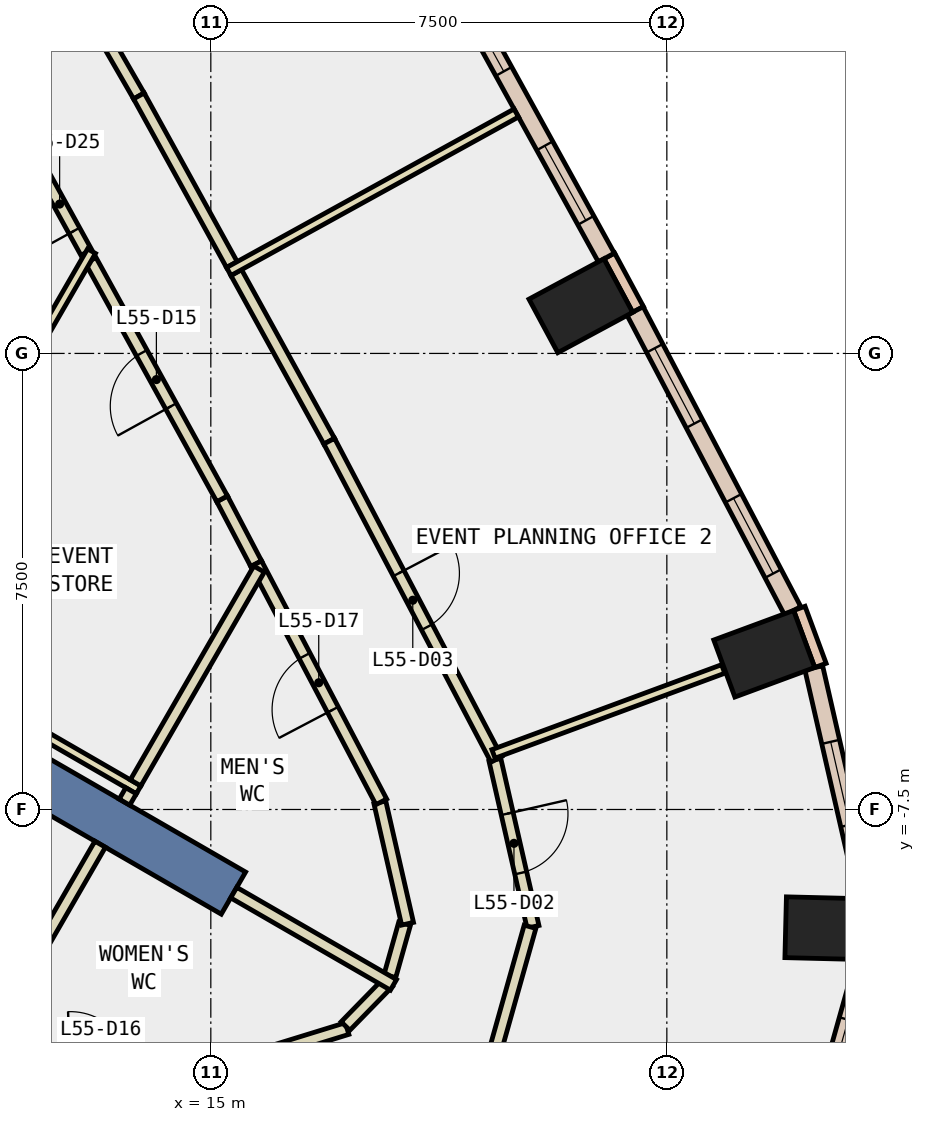
"""IFC4 building model, lengths in metres.
Left out: names, types, materials, properties, quantities, classifications, styles, units other than length and angle.
Written with IfcOpenShell. Run it as: python <this file> out.ifc"""

import sys

from ifc_helpers import new_model, si_unit, direction, frame, frame_2d, origin, origin_2d, place, context, subcontext, project, spatial, rectangle, extrude, element, fill, save


model = new_model("IFC4")
c1 = context("Model", 3, precision=1e-05, world=origin(), true_north=direction((0.0, 1.0)))
c2 = subcontext(c1, "Body", "Model", "MODEL_VIEW")
j1 = project(units=[si_unit("LENGTHUNIT", "METRE"), si_unit("PLANEANGLEUNIT", "RADIAN")], contexts=[c1])
p1 = place(None, origin())
s1 = spatial("IfcSite", under=j1, at=p1, CompositionType="ELEMENT")
p2 = place(p1, origin())
s2 = spatial("IfcBuilding", under=s1, at=p2, CompositionType="ELEMENT")
p3 = place(p2, frame((0.0, 0.0, 245.0)))
s3 = spatial("IfcBuildingStorey", under=s2, at=p3, CompositionType="ELEMENT", Elevation=245.0)
for number, where, z_axis, x_axis in (
    (1, (25.154, -9.454, -0.34), (0.0, 0.0, 1.0), (0.025, 1.0, 0.0)),
    (2, (24.102, -4.939, -0.34), (0.0, 0.0, 1.0), (-0.347, 0.938, 0.0)),
    (3, (21.086, 0.784, -0.34), (0.0, 0.0, 1.0), (-0.474, 0.881, 0.0)),
):
    element("IfcColumn", number, at=place(p3, frame(where, z_axis=z_axis, x_axis=x_axis)), inside=s3, PredefinedType="COLUMN", context=c2, shape_type="SweptSolid", body=[
        extrude(rectangle(XDim=1.0, YDim=1.4, at=origin_2d()), origin(), (0.0, 0.0, 1.0), 3.6),
    ])
p4 = place(p3, frame((7.578, -4.375, -0.34), z_axis=(0.0, 0.0, 1.0), x_axis=(0.866024315419, -0.5000018851, 0.0)))
e4 = element("IfcWall", 4, at=p4, inside=s3, PredefinedType="SHEAR", context=c2, shape_type="SweptSolid", body=[
    extrude(rectangle(XDim=9.0, YDim=0.8, at=frame_2d((4.5, 0.0))), origin(), (0.0, 0.0, 1.0), 3.6),
])
p5 = place(p3, frame((25.026, -5.131, 0.0), z_axis=(0.0, 0.0, 1.0), x_axis=(-0.346892928577, 0.937904737222, 0.0)))
e5 = element("IfcWall", 5, at=p5, inside=s3, PredefinedType="STANDARD", context=c2, shape_type="SweptSolid", body=[
    extrude(rectangle(XDim=1.0, YDim=0.2, at=frame_2d((0.5, 0.0))), origin(), (0.0, 0.0, 1.0), 3.26),
])
p6 = place(p3, frame((22.027, 0.723, 0.0), z_axis=(0.0, 0.0, 1.0), x_axis=(-0.473852444207, 0.880604259085, 0.0)))
e6 = element("IfcWall", 6, at=p6, inside=s3, PredefinedType="STANDARD", context=c2, shape_type="SweptSolid", body=[
    extrude(rectangle(XDim=1.0, YDim=0.2, at=frame_2d((0.5, 0.0))), origin(), (0.0, 0.0, 1.0), 3.26),
])
p7 = place(p3, frame((24.824, -13.295, 0.0), z_axis=(0.0, 0.0, 1.0), x_axis=(0.270837632743, 0.962625044703, 0.0)))
e7 = element("IfcWall", 7, at=p7, inside=s3, PredefinedType="STANDARD", context=c2, shape_type="SweptSolid", body=[
    extrude(rectangle(XDim=3.456, YDim=0.3, at=frame_2d((1.728, 0.0))), origin(), (0.0, 0.0, 1.0), 3.26),
])
p8 = place(p7, frame((1.028, 0.0, 0.9)))
e8 = element("IfcOpeningElement", 8, at=p8, cuts=e7, PredefinedType="OPENING", context=c2, shape_type="SweptSolid", body=[
    extrude(rectangle(XDim=1.4, YDim=2.0, at=frame_2d((0.7, 1.0))), frame((0.0, 0.16, 0.0), z_axis=(0.0, -1.0, 0.0), x_axis=(1.0, 0.0, 0.0)), (0.0, 0.0, 1.0), 0.32),
])
p9 = place(p3, frame((25.785, -8.97, 0.0), z_axis=(0.0, 0.0, 1.0), x_axis=(-0.222901327396, 0.974841011778, 0.0)))
e9 = element("IfcWall", 9, at=p9, inside=s3, PredefinedType="STANDARD", context=c2, shape_type="SweptSolid", body=[
    extrude(rectangle(XDim=3.898, YDim=0.3, at=frame_2d((1.949, 0.0))), origin(), (0.0, 0.0, 1.0), 3.26),
])
p10 = place(p9, frame((1.249, 0.0, 0.9)))
e10 = element("IfcOpeningElement", 10, at=p10, cuts=e9, PredefinedType="OPENING", context=c2, shape_type="SweptSolid", body=[
    extrude(rectangle(XDim=1.4, YDim=2.0, at=frame_2d((0.7, 1.0))), frame((0.0, 0.16, 0.0), z_axis=(0.0, -1.0, 0.0), x_axis=(1.0, 0.0, 0.0)), (0.0, 0.0, 1.0), 0.32),
])
p11 = place(p3, frame((24.57, -4.234, 0.0), z_axis=(0.0, 0.0, 1.0), x_axis=(-0.465228032148, 0.885190871001, 0.0)))
e11 = element("IfcWall", 11, at=p11, inside=s3, PredefinedType="STANDARD", context=c2, shape_type="SweptSolid", body=[
    extrude(rectangle(XDim=5.572, YDim=0.3, at=frame_2d((2.786, 0.0))), origin(), (0.0, 0.0, 1.0), 3.26),
])
p12 = place(p11, frame((0.693, 0.0, 0.9)))
e12 = element("IfcOpeningElement", 12, at=p12, cuts=e11, PredefinedType="OPENING", context=c2, shape_type="SweptSolid", body=[
    extrude(rectangle(XDim=1.4, YDim=2.0, at=frame_2d((0.7, 1.0))), frame((0.0, 0.16, 0.0), z_axis=(0.0, -1.0, 0.0), x_axis=(1.0, 0.0, 0.0)), (0.0, 0.0, 1.0), 0.32),
])
p13 = place(p11, frame((3.479, 0.0, 0.9)))
e13 = element("IfcOpeningElement", 13, at=p13, cuts=e11, PredefinedType="OPENING", context=c2, shape_type="SweptSolid", body=[
    extrude(rectangle(XDim=1.4, YDim=2.0, at=frame_2d((0.7, 1.0))), frame((0.0, 0.16, 0.0), z_axis=(0.0, -1.0, 0.0), x_axis=(1.0, 0.0, 0.0)), (0.0, 0.0, 1.0), 0.32),
])
p14 = place(p3, frame((21.505, 1.577, 0.0), z_axis=(0.0, 0.0, 1.0), x_axis=(-0.482734585173, 0.875766704253, 0.0)))
e14 = element("IfcWall", 14, at=p14, inside=s3, PredefinedType="STANDARD", context=c2, shape_type="SweptSolid", body=[
    extrude(rectangle(XDim=5.593, YDim=0.3, at=frame_2d((2.796, 0.0))), origin(), (0.0, 0.0, 1.0), 3.26),
])
p15 = place(p14, frame((0.698, 0.0, 0.9)))
e15 = element("IfcOpeningElement", 15, at=p15, cuts=e14, PredefinedType="OPENING", context=c2, shape_type="SweptSolid", body=[
    extrude(rectangle(XDim=1.4, YDim=2.0, at=frame_2d((0.7, 1.0))), frame((0.0, 0.16, 0.0), z_axis=(0.0, -1.0, 0.0), x_axis=(1.0, 0.0, 0.0)), (0.0, 0.0, 1.0), 0.32),
])
p16 = place(p14, frame((3.495, 0.0, 0.9)))
e16 = element("IfcOpeningElement", 16, at=p16, cuts=e14, PredefinedType="OPENING", context=c2, shape_type="SweptSolid", body=[
    extrude(rectangle(XDim=1.4, YDim=2.0, at=frame_2d((0.7, 1.0))), frame((0.0, 0.16, 0.0), z_axis=(0.0, -1.0, 0.0), x_axis=(1.0, 0.0, 0.0)), (0.0, 0.0, 1.0), 0.32),
])
p17 = place(p3, frame((12.952, 1.661, 0.0), z_axis=(0.0, 0.0, 1.0), x_axis=(-0.482707835392, 0.875781448566, 0.0)))
e17 = element("IfcWall", 17, at=p17, inside=s3, PredefinedType="PARTITIONING", context=c2, shape_type="SweptSolid", body=[
    extrude(rectangle(XDim=1.817, YDim=0.2, at=frame_2d((0.908, 0.0))), origin(), (0.0, 0.0, 1.0), 3.26),
])
p18 = place(p17, frame((0.408, 0.0, 0.0)))
e18 = element("IfcOpeningElement", 18, at=p18, cuts=e17, PredefinedType="OPENING", context=c2, shape_type="SweptSolid", body=[
    extrude(rectangle(XDim=1.0, YDim=2.1, at=frame_2d((0.5, 1.05))), frame((0.0, 0.11, 0.0), z_axis=(0.0, -1.0, 0.0), x_axis=(1.0, 0.0, 0.0)), (0.0, 0.0, 1.0), 0.22),
])
p19 = place(p3, frame((15.746, -3.458, 0.0), z_axis=(0.0, 0.0, 1.0), x_axis=(-0.464794189951, 0.885418748948, 0.0)))
e19 = element("IfcWall", 19, at=p19, inside=s3, PredefinedType="PARTITIONING", context=c2, shape_type="SweptSolid", body=[
    extrude(rectangle(XDim=1.205, YDim=0.2, at=frame_2d((0.603, 0.0))), origin(), (0.0, 0.0, 1.0), 3.26),
])
p20 = place(p3, frame((15.186, -2.391, 0.0), z_axis=(0.0, 0.0, 1.0), x_axis=(-0.482858240592, 0.875698532311, 0.0)))
e20 = element("IfcWall", 20, at=p20, inside=s3, PredefinedType="PARTITIONING", context=c2, shape_type="SweptSolid", body=[
    extrude(rectangle(XDim=4.478, YDim=0.2, at=frame_2d((2.239, 0.0))), origin(), (0.0, 0.0, 1.0), 3.26),
])
p21 = place(p20, frame((1.739, 0.0, 0.0)))
e21 = element("IfcOpeningElement", 21, at=p21, cuts=e20, PredefinedType="OPENING", context=c2, shape_type="SweptSolid", body=[
    extrude(rectangle(XDim=1.0, YDim=2.1, at=frame_2d((0.5, 1.05))), frame((0.0, 0.11, 0.0), z_axis=(0.0, -1.0, 0.0), x_axis=(1.0, 0.0, 0.0)), (0.0, 0.0, 1.0), 0.22),
])
p22 = place(p3, frame((15.295, -11.703, 0.0), z_axis=(0.0, 0.0, 1.0), x_axis=(0.95563113363, 0.294566013716, 0.0)))
e22 = element("IfcWall", 22, at=p22, inside=s3, PredefinedType="PARTITIONING", context=c2, shape_type="SweptSolid", body=[
    extrude(rectangle(XDim=2.036, YDim=0.2, at=frame_2d((1.018, 0.0))), origin(), (0.0, 0.0, 1.0), 3.26),
])
p23 = place(p3, frame((17.215, -11.061, 0.0), z_axis=(0.0, 0.0, 1.0), x_axis=(0.698527813511, 0.715582904877, 0.0)))
e23 = element("IfcWall", 23, at=p23, inside=s3, PredefinedType="PARTITIONING", context=c2, shape_type="SweptSolid", body=[
    extrude(rectangle(XDim=1.002, YDim=0.2, at=frame_2d((0.501, 0.0))), origin(), (0.0, 0.0, 1.0), 3.26),
])
p24 = place(p3, frame((17.945, -10.238, 0.0), z_axis=(0.0, 0.0, 1.0), x_axis=(0.270785141481, 0.962639811743, 0.0)))
e24 = element("IfcWall", 24, at=p24, inside=s3, PredefinedType="PARTITIONING", context=c2, shape_type="SweptSolid", body=[
    extrude(rectangle(XDim=0.894, YDim=0.2, at=frame_2d((0.447, 0.0))), origin(), (0.0, 0.0, 1.0), 3.26),
])
p25 = place(p3, frame((18.236, -9.379, 0.0), z_axis=(0.0, 0.0, 1.0), x_axis=(-0.222760041204, 0.974873306662, 0.0)))
e25 = element("IfcWall", 25, at=p25, inside=s3, PredefinedType="PARTITIONING", context=c2, shape_type="SweptSolid", body=[
    extrude(rectangle(XDim=2.047, YDim=0.2, at=frame_2d((1.024, 0.0))), origin(), (0.0, 0.0, 1.0), 3.26),
])
p26 = place(p3, frame((17.804, -7.374, 0.0), z_axis=(0.0, 0.0, 1.0), x_axis=(-0.465179971699, 0.885216128372, 0.0)))
e26 = element("IfcWall", 26, at=p26, inside=s3, PredefinedType="PARTITIONING", context=c2, shape_type="SweptSolid", body=[
    extrude(rectangle(XDim=4.424, YDim=0.2, at=frame_2d((2.212, 0.0))), origin(), (0.0, 0.0, 1.0), 3.26),
])
p27 = place(p26, frame((1.712, 0.0, 0.0)))
e27 = element("IfcOpeningElement", 27, at=p27, cuts=e26, PredefinedType="OPENING", context=c2, shape_type="SweptSolid", body=[
    extrude(rectangle(XDim=1.0, YDim=2.1, at=frame_2d((0.5, 1.05))), frame((0.0, 0.11, 0.0), z_axis=(0.0, -1.0, 0.0), x_axis=(1.0, 0.0, 0.0)), (0.0, 0.0, 1.0), 0.22),
])
p28 = place(p3, frame((19.672, -6.683, 0.0), z_axis=(0.0, 0.0, 1.0), x_axis=(0.222523624687, -0.974927298036, 0.0)))
e28 = element("IfcWall", 28, at=p28, inside=s3, PredefinedType="PARTITIONING", context=c2, shape_type="SweptSolid", body=[
    extrude(rectangle(XDim=2.817, YDim=0.2, at=frame_2d((1.409, 0.0))), origin(), (0.0, 0.0, 1.0), 3.26),
])
p29 = place(p28, frame((0.909, 0.0, 0.0)))
e29 = element("IfcOpeningElement", 29, at=p29, cuts=e28, PredefinedType="OPENING", context=c2, shape_type="SweptSolid", body=[
    extrude(rectangle(XDim=1.0, YDim=2.1, at=frame_2d((0.5, 1.05))), frame((0.0, 0.11, 0.0), z_axis=(0.0, -1.0, 0.0), x_axis=(1.0, 0.0, 0.0)), (0.0, 0.0, 1.0), 0.22),
])
p30 = place(p3, frame((20.25, -9.429, 0.0), z_axis=(0.0, 0.0, 1.0), x_axis=(-0.270905475888, -0.962605954238, 0.0)))
e30 = element("IfcWall", 30, at=p30, inside=s3, PredefinedType="PARTITIONING", context=c2, shape_type="SweptSolid", body=[
    extrude(rectangle(XDim=2.122, YDim=0.2, at=frame_2d((1.061, 0.0))), origin(), (0.0, 0.0, 1.0), 3.26),
])
p31 = place(p3, frame((15.418, 1.33, 0.0), z_axis=(0.0, 0.0, 1.0), x_axis=(0.482838875149, -0.875709210095, 0.0)))
e31 = element("IfcWall", 31, at=p31, inside=s3, PredefinedType="PARTITIONING", context=c2, shape_type="SweptSolid", body=[
    extrude(rectangle(XDim=3.167, YDim=0.2, at=frame_2d((1.583, 0.0))), origin(), (0.0, 0.0, 1.0), 3.26),
])
p32 = place(p3, frame((16.947, -1.443, 0.0), z_axis=(0.0, 0.0, 1.0), x_axis=(0.465133414481, -0.88524059257, 0.0)))
e32 = element("IfcWall", 32, at=p32, inside=s3, PredefinedType="PARTITIONING", context=c2, shape_type="SweptSolid", body=[
    extrude(rectangle(XDim=5.91, YDim=0.2, at=frame_2d((2.955, 0.0))), origin(), (0.0, 0.0, 1.0), 3.26),
])
p33 = place(p32, frame((2.455, 0.0, 0.0)))
e33 = element("IfcOpeningElement", 33, at=p33, cuts=e32, PredefinedType="OPENING", context=c2, shape_type="SweptSolid", body=[
    extrude(rectangle(XDim=1.0, YDim=2.1, at=frame_2d((0.5, 1.05))), frame((0.0, 0.11, 0.0), z_axis=(0.0, -1.0, 0.0), x_axis=(1.0, 0.0, 0.0)), (0.0, 0.0, 1.0), 0.22),
])
p34 = place(p3, frame((12.234, 6.977, 0.0), z_axis=(0.0, 0.0, 1.0), x_axis=(0.499820325382, -0.866129114125, 0.0)))
e34 = element("IfcWall", 34, at=p34, inside=s3, PredefinedType="PARTITIONING", context=c2, shape_type="SweptSolid", body=[
    extrude(rectangle(XDim=3.167, YDim=0.2, at=frame_2d((1.583, 0.0))), origin(), (0.0, 0.0, 1.0), 3.26),
])
p35 = place(p34, frame((1.084, 0.0, 0.0)))
e35 = element("IfcOpeningElement", 35, at=p35, cuts=e34, PredefinedType="OPENING", context=c2, shape_type="SweptSolid", body=[
    extrude(rectangle(XDim=1.0, YDim=2.1, at=frame_2d((0.5, 1.05))), frame((0.0, 0.11, 0.0), z_axis=(0.0, -1.0, 0.0), x_axis=(1.0, 0.0, 0.0)), (0.0, 0.0, 1.0), 0.22),
])
p36 = place(p3, frame((13.817, 4.234, 0.0), z_axis=(0.0, 0.0, 1.0), x_axis=(0.482871474341, -0.875691235121, 0.0)))
e36 = element("IfcWall", 36, at=p36, inside=s3, PredefinedType="PARTITIONING", context=c2, shape_type="SweptSolid", body=[
    extrude(rectangle(XDim=3.167, YDim=0.2, at=frame_2d((1.583, 0.0))), origin(), (0.0, 0.0, 1.0), 3.26),
])
p37 = place(p3, frame((9.358, -4.692, 0.0), z_axis=(0.0, 0.0, 1.0), x_axis=(0.500027777314, 0.866009365951, 0.0)))
e37 = element("IfcWall", 37, at=p37, inside=s3, PredefinedType="PARTITIONING", context=c2, shape_type="SweptSolid", body=[
    extrude(rectangle(XDim=7.36, YDim=0.15, at=frame_2d((3.68, 0.0))), origin(), (0.0, 0.0, 1.0), 3.26),
])
p38 = place(p3, frame((9.395, -4.627, 0.0), z_axis=(0.0, 0.0, 1.0), x_axis=(0.866034131428, -0.499984882974, 0.0)))
e38 = element("IfcWall", 38, at=p38, inside=s3, PredefinedType="PARTITIONING", context=c2, shape_type="SweptSolid", body=[
    extrude(rectangle(XDim=5.1, YDim=0.15, at=frame_2d((2.55, 0.0))), origin(), (0.0, 0.0, 1.0), 3.26),
])
p39 = place(p3, frame((13.18, -8.071, 0.0), z_axis=(0.0, 0.0, 1.0), x_axis=(-0.499914724673, -0.86607463192, 0.0)))
e39 = element("IfcWall", 39, at=p39, inside=s3, PredefinedType="PARTITIONING", context=c2, shape_type="SweptSolid", body=[
    extrude(rectangle(XDim=4.507, YDim=0.2, at=frame_2d((2.253, 0.0))), origin(), (0.0, 0.0, 1.0), 3.26),
])
p40 = place(p3, frame((13.688, -7.192, 0.0), z_axis=(0.0, 0.0, 1.0), x_axis=(-0.499787711288, -0.866147934042, 0.0)))
e40 = element("IfcWall", 40, at=p40, inside=s3, PredefinedType="PARTITIONING", context=c2, shape_type="SweptSolid", body=[
    extrude(rectangle(XDim=0.216, YDim=0.2, at=frame_2d((0.108, 0.0))), origin(), (0.0, 0.0, 1.0), 3.26),
])
p41 = place(p3, frame((15.793, -3.546, 0.0), z_axis=(0.0, 0.0, 1.0), x_axis=(-0.500000064182, -0.866025366729, 0.0)))
e41 = element("IfcWall", 41, at=p41, inside=s3, PredefinedType="PARTITIONING", context=c2, shape_type="SweptSolid", body=[
    extrude(rectangle(XDim=4.06, YDim=0.2, at=frame_2d((2.03, 0.0))), origin(), (0.0, 0.0, 1.0), 3.26),
])
p42 = place(p3, frame((15.377, -8.867, 0.0), z_axis=(0.0, 0.0, 1.0), x_axis=(0.865965767548, -0.500103278768, 0.0)))
e42 = element("IfcWall", 42, at=p42, inside=s3, PredefinedType="PARTITIONING", context=c2, shape_type="SweptSolid", body=[
    extrude(rectangle(XDim=3.033, YDim=0.2, at=frame_2d((1.517, 0.0))), origin(), (0.0, 0.0, 1.0), 3.26),
])
p43 = place(p3, frame((19.649, -6.586, 0.0), z_axis=(0.0, 0.0, 1.0), x_axis=(0.937935790958, 0.346808956114, 0.0)))
e43 = element("IfcWall", 43, at=p43, inside=s3, PredefinedType="PARTITIONING", context=c2, shape_type="SweptSolid", body=[
    extrude(rectangle(XDim=4.028, YDim=0.15, at=frame_2d((2.014, 0.0))), origin(), (0.0, 0.0, 1.0), 3.26),
])
p44 = place(p3, frame((15.295, 1.347, 0.0), z_axis=(0.0, 0.0, 1.0), x_axis=(0.875728645362, 0.482803624358, 0.0)))
e44 = element("IfcWall", 44, at=p44, inside=s3, PredefinedType="PARTITIONING", context=c2, shape_type="SweptSolid", body=[
    extrude(rectangle(XDim=5.4, YDim=0.15, at=frame_2d((2.7, 0.0))), origin(), (0.0, 0.0, 1.0), 3.26),
])
p45 = place(p8, origin())
e45 = element("IfcWindow", 45, at=p45, inside=s3, PartitioningType="SINGLE_PANEL", PredefinedType="WINDOW", context=c2, shape_type="SweptSolid", body=[
    extrude(rectangle(XDim=1.4, YDim=2.0, at=frame_2d((0.7, 1.0))), frame((0.0, 0.03, 0.0), z_axis=(0.0, -1.0, 0.0), x_axis=(1.0, 0.0, 0.0)), (0.0, 0.0, 1.0), 0.06),
])
fill(e8, e45)
p46 = place(p10, origin())
e46 = element("IfcWindow", 46, at=p46, inside=s3, PartitioningType="SINGLE_PANEL", PredefinedType="WINDOW", context=c2, shape_type="SweptSolid", body=[
    extrude(rectangle(XDim=1.4, YDim=2.0, at=frame_2d((0.7, 1.0))), frame((0.0, 0.03, 0.0), z_axis=(0.0, -1.0, 0.0), x_axis=(1.0, 0.0, 0.0)), (0.0, 0.0, 1.0), 0.06),
])
fill(e10, e46)
p47 = place(p12, origin())
e47 = element("IfcWindow", 47, at=p47, inside=s3, PartitioningType="SINGLE_PANEL", PredefinedType="WINDOW", context=c2, shape_type="SweptSolid", body=[
    extrude(rectangle(XDim=1.4, YDim=2.0, at=frame_2d((0.7, 1.0))), frame((0.0, 0.03, 0.0), z_axis=(0.0, -1.0, 0.0), x_axis=(1.0, 0.0, 0.0)), (0.0, 0.0, 1.0), 0.06),
])
fill(e12, e47)
p48 = place(p13, origin())
e48 = element("IfcWindow", 48, at=p48, inside=s3, PartitioningType="SINGLE_PANEL", PredefinedType="WINDOW", context=c2, shape_type="SweptSolid", body=[
    extrude(rectangle(XDim=1.4, YDim=2.0, at=frame_2d((0.7, 1.0))), frame((0.0, 0.03, 0.0), z_axis=(0.0, -1.0, 0.0), x_axis=(1.0, 0.0, 0.0)), (0.0, 0.0, 1.0), 0.06),
])
fill(e13, e48)
p49 = place(p15, origin())
e49 = element("IfcWindow", 49, at=p49, inside=s3, PartitioningType="SINGLE_PANEL", PredefinedType="WINDOW", context=c2, shape_type="SweptSolid", body=[
    extrude(rectangle(XDim=1.4, YDim=2.0, at=frame_2d((0.7, 1.0))), frame((0.0, 0.03, 0.0), z_axis=(0.0, -1.0, 0.0), x_axis=(1.0, 0.0, 0.0)), (0.0, 0.0, 1.0), 0.06),
])
fill(e15, e49)
p50 = place(p16, origin())
e50 = element("IfcWindow", 50, at=p50, inside=s3, PartitioningType="SINGLE_PANEL", PredefinedType="WINDOW", context=c2, shape_type="SweptSolid", body=[
    extrude(rectangle(XDim=1.4, YDim=2.0, at=frame_2d((0.7, 1.0))), frame((0.0, 0.03, 0.0), z_axis=(0.0, -1.0, 0.0), x_axis=(1.0, 0.0, 0.0)), (0.0, 0.0, 1.0), 0.06),
])
fill(e16, e50)
p51 = place(p29, origin())
e51 = element("IfcDoor", 51, at=p51, inside=s3, OperationType="SINGLE_SWING_LEFT", PredefinedType="DOOR", context=c2, shape_type="SweptSolid", body=[
    extrude(rectangle(XDim=1.0, YDim=2.1, at=frame_2d((0.5, 1.05))), frame((0.0, 0.025, 0.0), z_axis=(0.0, -1.0, 0.0), x_axis=(1.0, 0.0, 0.0)), (0.0, 0.0, 1.0), 0.05),
])
fill(e29, e51)
p52 = place(p33, origin())
e52 = element("IfcDoor", 52, at=p52, inside=s3, OperationType="SINGLE_SWING_LEFT", PredefinedType="DOOR", context=c2, shape_type="SweptSolid", body=[
    extrude(rectangle(XDim=1.0, YDim=2.1, at=frame_2d((0.5, 1.05))), frame((0.0, 0.025, 0.0), z_axis=(0.0, -1.0, 0.0), x_axis=(1.0, 0.0, 0.0)), (0.0, 0.0, 1.0), 0.05),
])
fill(e33, e52)
p53 = place(p21, origin())
e53 = element("IfcDoor", 53, at=p53, inside=s3, OperationType="SINGLE_SWING_LEFT", PredefinedType="DOOR", context=c2, shape_type="SweptSolid", body=[
    extrude(rectangle(XDim=1.0, YDim=2.1, at=frame_2d((0.5, 1.05))), frame((0.0, 0.025, 0.0), z_axis=(0.0, -1.0, 0.0), x_axis=(1.0, 0.0, 0.0)), (0.0, 0.0, 1.0), 0.05),
])
fill(e21, e53)
p54 = place(p27, origin())
e54 = element("IfcDoor", 54, at=p54, inside=s3, OperationType="SINGLE_SWING_LEFT", PredefinedType="DOOR", context=c2, shape_type="SweptSolid", body=[
    extrude(rectangle(XDim=1.0, YDim=2.1, at=frame_2d((0.5, 1.05))), frame((0.0, 0.025, 0.0), z_axis=(0.0, -1.0, 0.0), x_axis=(1.0, 0.0, 0.0)), (0.0, 0.0, 1.0), 0.05),
])
fill(e27, e54)
p55 = place(p18, origin())
e55 = element("IfcDoor", 55, at=p55, inside=s3, OperationType="SINGLE_SWING_RIGHT", PredefinedType="DOOR", context=c2, shape_type="SweptSolid", body=[
    extrude(rectangle(XDim=1.0, YDim=2.1, at=frame_2d((0.5, 1.05))), frame((0.0, 0.025, 0.0), z_axis=(0.0, -1.0, 0.0), x_axis=(1.0, 0.0, 0.0)), (0.0, 0.0, 1.0), 0.05),
])
fill(e18, e55)
save(model, sys.argv[1])
